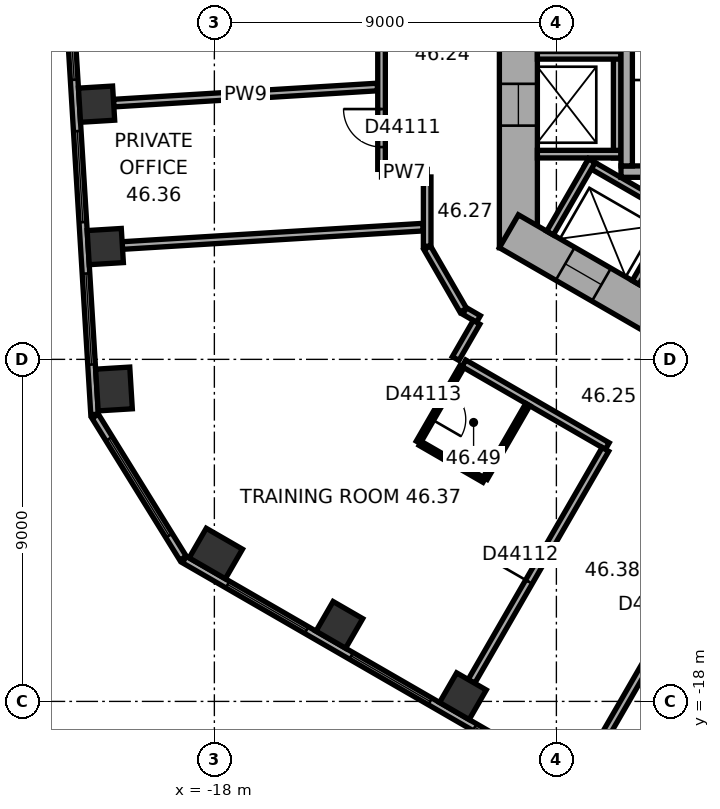
"""IFC4 building model, lengths in metres.
Left out: names, types, materials, properties, quantities, classifications, styles, units other than length and angle.
Written with IfcOpenShell. Run it as: python <this file> out.ifc"""

import sys

from ifc_helpers import new_model, si_unit, direction, frame, frame_2d, origin, origin_2d, place, context, subcontext, project, spatial, rectangle, extrude, element, fill, save


model = new_model("IFC4")
c1 = context("Model", 3, precision=1e-05, world=origin(), true_north=direction((0.0, 1.0)))
c2 = subcontext(c1, "Body", "Model", "MODEL_VIEW")
j1 = project(units=[si_unit("LENGTHUNIT", "METRE"), si_unit("PLANEANGLEUNIT", "RADIAN")], contexts=[c1])
p1 = place(None, origin())
s1 = spatial("IfcSite", under=j1, at=p1, CompositionType="ELEMENT")
p2 = place(p1, origin())
s2 = spatial("IfcBuilding", under=s1, at=p2, CompositionType="ELEMENT")
p3 = place(p2, frame((0.0, 0.0, 187.3)))
s3 = spatial("IfcBuildingStorey", under=s2, at=p3, CompositionType="ELEMENT", Elevation=187.3)
for number, where, z_axis, x_axis in (
    (1, (-21.1, -2.285, 0.0), (0.0, 0.0, 1.0), (0.061, -0.998, 0.0)),
    (2, (-20.871, -6.032, 0.0), (0.0, 0.0, 1.0), (0.061, -0.998, 0.0)),
):
    element("IfcColumn", number, at=place(p3, frame(where, z_axis=z_axis, x_axis=x_axis)), inside=s3, PredefinedType="COLUMN", context=c2, shape_type="SweptSolid", body=[
        extrude(rectangle(XDim=0.9, YDim=0.9, at=origin_2d()), origin(), (0.0, 0.0, 1.0), 3.7),
    ])
for number, where, z_axis, x_axis in (
    (3, (-20.642, -9.779, 0.0), (0.0, 0.0, 1.0), (0.061, -0.998, 0.0)),
    (4, (-17.962, -14.109, 0.0), (0.0, 0.0, 1.0), (0.866, -0.5, 0.0)),
):
    element("IfcColumn", number, at=place(p3, frame(where, z_axis=z_axis, x_axis=x_axis)), inside=s3, PredefinedType="COLUMN", context=c2, shape_type="SweptSolid", body=[
        extrude(rectangle(XDim=1.1, YDim=0.9, at=origin_2d()), origin(), (0.0, 0.0, 1.0), 3.7),
    ])
for number, where, z_axis, x_axis in (
    (5, (-14.711, -15.986, 0.0), (0.0, 0.0, 1.0), (0.866, -0.5, 0.0)),
    (6, (-11.46, -17.863, 0.0), (0.0, 0.0, 1.0), (0.866, -0.5, 0.0)),
):
    element("IfcColumn", number, at=place(p3, frame(where, z_axis=z_axis, x_axis=x_axis)), inside=s3, PredefinedType="COLUMN", context=c2, shape_type="SweptSolid", body=[
        extrude(rectangle(XDim=0.9, YDim=0.9, at=origin_2d()), origin(), (0.0, 0.0, 1.0), 3.7),
    ])
p4 = place(p3, frame((-10.0, 6.062, 0.0), z_axis=(0.0, 0.0, 1.0), x_axis=(0.0, -1.0, 0.0)))
e7 = element("IfcWall", 7, at=p4, inside=s3, PredefinedType="SHEAR", context=c2, shape_type="SweptSolid", body=[
    extrude(rectangle(XDim=12.125, YDim=1.0, at=frame_2d((6.062, 0.0))), origin(), (0.0, 0.0, 1.0), 3.7),
])
p5 = place(p4, frame((5.212, 0.0, 0.0)))
e8 = element("IfcOpeningElement", 8, at=p5, cuts=e7, PredefinedType="OPENING", context=c2, shape_type="SweptSolid", body=[
    extrude(rectangle(XDim=1.1, YDim=2.1, at=frame_2d((0.55, 1.05))), frame((0.0, 0.51, 0.0), z_axis=(0.0, -1.0, 0.0), x_axis=(1.0, 0.0, 0.0)), (0.0, 0.0, 1.0), 1.02),
])
p6 = place(p4, frame((7.812, 0.0, 0.0)))
e9 = element("IfcOpeningElement", 9, at=p6, cuts=e7, PredefinedType="OPENING", context=c2, shape_type="SweptSolid", body=[
    extrude(rectangle(XDim=1.1, YDim=2.1, at=frame_2d((0.55, 1.05))), frame((0.0, 0.51, 0.0), z_axis=(0.0, -1.0, 0.0), x_axis=(1.0, 0.0, 0.0)), (0.0, 0.0, 1.0), 1.02),
])
p7 = place(p3, frame((-10.25, -5.629, 0.0), z_axis=(0.0, 0.0, 1.0), x_axis=(0.866022616891, -0.50000482701, 0.0)))
e10 = element("IfcWall", 10, at=p7, inside=s3, PredefinedType="SHEAR", context=c2, shape_type="SweptSolid", body=[
    extrude(rectangle(XDim=12.125, YDim=1.0, at=frame_2d((6.062, 0.0))), origin(), (0.0, 0.0, 1.0), 3.7),
])
p8 = place(p7, frame((6.262, 0.0, 0.0)))
e11 = element("IfcOpeningElement", 11, at=p8, cuts=e10, PredefinedType="OPENING", context=c2, shape_type="SweptSolid", body=[
    extrude(rectangle(XDim=1.5, YDim=2.1, at=frame_2d((0.75, 1.05))), frame((0.0, 0.51, 0.0), z_axis=(0.0, -1.0, 0.0), x_axis=(1.0, 0.0, 0.0)), (0.0, 0.0, 1.0), 1.02),
])
p9 = place(p7, frame((1.712, 0.0, 0.0)))
e12 = element("IfcOpeningElement", 12, at=p9, cuts=e10, PredefinedType="OPENING", context=c2, shape_type="SweptSolid", body=[
    extrude(rectangle(XDim=1.1, YDim=2.1, at=frame_2d((0.55, 1.05))), frame((0.0, 0.51, 0.0), z_axis=(0.0, -1.0, 0.0), x_axis=(1.0, 0.0, 0.0)), (0.0, 0.0, 1.0), 1.02),
])
p10 = place(p7, frame((4.312, 0.0, 0.0)))
e13 = element("IfcOpeningElement", 13, at=p10, cuts=e10, PredefinedType="OPENING", context=c2, shape_type="SweptSolid", body=[
    extrude(rectangle(XDim=1.1, YDim=2.1, at=frame_2d((0.55, 1.05))), frame((0.0, 0.51, 0.0), z_axis=(0.0, -1.0, 0.0), x_axis=(1.0, 0.0, 0.0)), (0.0, 0.0, 1.0), 1.02),
])
p11 = place(p3, frame((-22.375, 9.557, 0.0), z_axis=(0.0, 0.0, 1.0), x_axis=(0.061036015339, -0.998135564356, 0.0)))
e14 = element("IfcWall", 14, at=p11, inside=s3, PredefinedType="STANDARD", context=c2, shape_type="SweptSolid", body=[
    extrude(rectangle(XDim=20.044, YDim=0.2, at=frame_2d((10.022, 0.0))), origin(), (0.0, 0.0, 1.0), 3.7),
])
p12 = place(p11, frame((1.313, 0.0, 0.9)))
e15 = element("IfcOpeningElement", 15, at=p12, cuts=e14, PredefinedType="OPENING", context=c2, shape_type="SweptSolid", body=[
    extrude(rectangle(XDim=2.4, YDim=2.0, at=frame_2d((1.2, 1.0))), frame((0.0, 0.11, 0.0), z_axis=(0.0, -1.0, 0.0), x_axis=(1.0, 0.0, 0.0)), (0.0, 0.0, 1.0), 0.22),
])
p13 = place(p11, frame((5.067, 0.0, 0.9)))
e16 = element("IfcOpeningElement", 16, at=p13, cuts=e14, PredefinedType="OPENING", context=c2, shape_type="SweptSolid", body=[
    extrude(rectangle(XDim=2.4, YDim=2.0, at=frame_2d((1.2, 1.0))), frame((0.0, 0.11, 0.0), z_axis=(0.0, -1.0, 0.0), x_axis=(1.0, 0.0, 0.0)), (0.0, 0.0, 1.0), 0.22),
])
p14 = place(p11, frame((8.821, 0.0, 0.9)))
e17 = element("IfcOpeningElement", 17, at=p14, cuts=e14, PredefinedType="OPENING", context=c2, shape_type="SweptSolid", body=[
    extrude(rectangle(XDim=2.4, YDim=2.0, at=frame_2d((1.2, 1.0))), frame((0.0, 0.11, 0.0), z_axis=(0.0, -1.0, 0.0), x_axis=(1.0, 0.0, 0.0)), (0.0, 0.0, 1.0), 0.22),
])
p15 = place(p11, frame((12.575, 0.0, 0.9)))
e18 = element("IfcOpeningElement", 18, at=p15, cuts=e14, PredefinedType="OPENING", context=c2, shape_type="SweptSolid", body=[
    extrude(rectangle(XDim=2.4, YDim=2.0, at=frame_2d((1.2, 1.0))), frame((0.0, 0.11, 0.0), z_axis=(0.0, -1.0, 0.0), x_axis=(1.0, 0.0, 0.0)), (0.0, 0.0, 1.0), 0.22),
])
p16 = place(p11, frame((16.329, 0.0, 0.9)))
e19 = element("IfcOpeningElement", 19, at=p16, cuts=e14, PredefinedType="OPENING", context=c2, shape_type="SweptSolid", body=[
    extrude(rectangle(XDim=2.4, YDim=2.0, at=frame_2d((1.2, 1.0))), frame((0.0, 0.11, 0.0), z_axis=(0.0, -1.0, 0.0), x_axis=(1.0, 0.0, 0.0)), (0.0, 0.0, 1.0), 0.22),
])
p17 = place(p3, frame((-21.137, -10.496, 0.0), z_axis=(0.0, 0.0, 1.0), x_axis=(0.526178661629, -0.850374044786, 0.0)))
e20 = element("IfcWall", 20, at=p17, inside=s3, PredefinedType="STANDARD", context=c2, shape_type="SweptSolid", body=[
    extrude(rectangle(XDim=4.395, YDim=0.2, at=frame_2d((2.197, 0.0))), origin(), (0.0, 0.0, 1.0), 3.7),
])
p18 = place(p17, frame((0.698, 0.0, 0.9)))
e21 = element("IfcOpeningElement", 21, at=p18, cuts=e20, PredefinedType="OPENING", context=c2, shape_type="SweptSolid", body=[
    extrude(rectangle(XDim=3.0, YDim=2.0, at=frame_2d((1.5, 1.0))), frame((0.0, 0.11, 0.0), z_axis=(0.0, -1.0, 0.0), x_axis=(1.0, 0.0, 0.0)), (0.0, 0.0, 1.0), 0.22),
])
p19 = place(p3, frame((-18.789, -14.267, 0.0), z_axis=(0.0, 0.0, 1.0), x_axis=(0.866023315909, -0.500003616288, 0.0)))
e22 = element("IfcWall", 22, at=p19, inside=s3, PredefinedType="STANDARD", context=c2, shape_type="SweptSolid", body=[
    extrude(rectangle(XDim=20.044, YDim=0.2, at=frame_2d((10.022, 0.0))), origin(), (0.0, 0.0, 1.0), 3.7),
])
p20 = place(p19, frame((1.314, 0.0, 0.9)))
e23 = element("IfcOpeningElement", 23, at=p20, cuts=e22, PredefinedType="OPENING", context=c2, shape_type="SweptSolid", body=[
    extrude(rectangle(XDim=2.4, YDim=2.0, at=frame_2d((1.2, 1.0))), frame((0.0, 0.11, 0.0), z_axis=(0.0, -1.0, 0.0), x_axis=(1.0, 0.0, 0.0)), (0.0, 0.0, 1.0), 0.22),
])
p21 = place(p19, frame((5.069, 0.0, 0.9)))
e24 = element("IfcOpeningElement", 24, at=p21, cuts=e22, PredefinedType="OPENING", context=c2, shape_type="SweptSolid", body=[
    extrude(rectangle(XDim=2.4, YDim=2.0, at=frame_2d((1.2, 1.0))), frame((0.0, 0.11, 0.0), z_axis=(0.0, -1.0, 0.0), x_axis=(1.0, 0.0, 0.0)), (0.0, 0.0, 1.0), 0.22),
])
p22 = place(p19, frame((8.823, 0.0, 0.9)))
e25 = element("IfcOpeningElement", 25, at=p22, cuts=e22, PredefinedType="OPENING", context=c2, shape_type="SweptSolid", body=[
    extrude(rectangle(XDim=2.4, YDim=2.0, at=frame_2d((1.2, 1.0))), frame((0.0, 0.11, 0.0), z_axis=(0.0, -1.0, 0.0), x_axis=(1.0, 0.0, 0.0)), (0.0, 0.0, 1.0), 0.22),
])
p23 = place(p19, frame((12.577, 0.0, 0.9)))
e26 = element("IfcOpeningElement", 26, at=p23, cuts=e22, PredefinedType="OPENING", context=c2, shape_type="SweptSolid", body=[
    extrude(rectangle(XDim=2.4, YDim=2.0, at=frame_2d((1.2, 1.0))), frame((0.0, 0.11, 0.0), z_axis=(0.0, -1.0, 0.0), x_axis=(1.0, 0.0, 0.0)), (0.0, 0.0, 1.0), 0.22),
])
p24 = place(p19, frame((16.331, 0.0, 0.9)))
e27 = element("IfcOpeningElement", 27, at=p24, cuts=e22, PredefinedType="OPENING", context=c2, shape_type="SweptSolid", body=[
    extrude(rectangle(XDim=2.4, YDim=2.0, at=frame_2d((1.2, 1.0))), frame((0.0, 0.11, 0.0), z_axis=(0.0, -1.0, 0.0), x_axis=(1.0, 0.0, 0.0)), (0.0, 0.0, 1.0), 0.22),
])
p25 = place(p3, frame((-7.4, 4.3, 0.0), z_axis=(0.0, 0.0, 1.0), x_axis=(0.0, -1.0, 0.0)))
e28 = element("IfcWall", 28, at=p25, inside=s3, PredefinedType="PARTITIONING", context=c2, shape_type="SweptSolid", body=[
    extrude(rectangle(XDim=8.0, YDim=0.2, at=frame_2d((4.0, 0.0))), origin(), (0.0, 0.0, 1.0), 3.42),
])
for number, where, z_axis, x_axis in (
    (29, (-7.3, -1.0, 0.0), (0.0, 0.0, 1.0), (-1.0, 0.0, 0.0)),
    (30, (-7.3, -3.6, 0.0), (0.0, 0.0, 1.0), (-1.0, 0.0, 0.0)),
):
    element("IfcWall", number, at=place(p3, frame(where, z_axis=z_axis, x_axis=x_axis)), inside=s3, PredefinedType="PARTITIONING", context=c2, shape_type="SweptSolid", body=[
        extrude(rectangle(XDim=2.2, YDim=0.2, at=frame_2d((1.1, 0.0))), origin(), (0.0, 0.0, 1.0), 3.42),
    ])
p26 = place(p3, frame((-8.203, -3.809, 0.0), z_axis=(0.0, 0.0, 1.0), x_axis=(0.866028230842, -0.499995103361, 0.0)))
e31 = element("IfcWall", 31, at=p26, inside=s3, PredefinedType="PARTITIONING", context=c2, shape_type="SweptSolid", body=[
    extrude(rectangle(XDim=5.4, YDim=0.2, at=frame_2d((2.7, 0.0))), origin(), (0.0, 0.0, 1.0), 3.42),
])
for number, where, z_axis, x_axis in (
    (32, (-8.067, -3.772, 0.0), (0.0, 0.0, 1.0), (-0.5, -0.866, 0.0)),
    (33, (-5.815, -5.072, 0.0), (0.0, 0.0, 1.0), (-0.5, -0.866, 0.0)),
):
    element("IfcWall", number, at=place(p3, frame(where, z_axis=z_axis, x_axis=x_axis)), inside=s3, PredefinedType="PARTITIONING", context=c2, shape_type="SweptSolid", body=[
        extrude(rectangle(XDim=2.2, YDim=0.2, at=frame_2d((1.1, 0.0))), origin(), (0.0, 0.0, 1.0), 3.42),
    ])
p27 = place(p3, frame((-2.6, -4.06, 0.0), z_axis=(0.0, 0.0, 1.0), x_axis=(-1.0, 0.0, 0.0)))
e34 = element("IfcWall", 34, at=p27, inside=s3, PredefinedType="SHEAR", context=c2, shape_type="SweptSolid", body=[
    extrude(rectangle(XDim=4.7, YDim=0.3, at=frame_2d((2.35, 0.0))), origin(), (0.0, 0.0, 1.0), 3.42),
])
p28 = place(p3, frame((-7.15, 3.15, 0.0), z_axis=(0.0, 0.0, 1.0), x_axis=(0.0, -1.0, 0.0)))
e35 = element("IfcWall", 35, at=p28, inside=s3, PredefinedType="SHEAR", context=c2, shape_type="SweptSolid", body=[
    extrude(rectangle(XDim=7.06, YDim=0.3, at=frame_2d((3.53, 0.0))), origin(), (0.0, 0.0, 1.0), 3.42),
])
p29 = place(p3, frame((-20.651, -2.258, 0.0), z_axis=(0.0, 0.0, 1.0), x_axis=(0.998133960965, 0.061062230286, 0.0)))
e36 = element("IfcWall", 36, at=p29, inside=s3, PredefinedType="PARTITIONING", context=c2, shape_type="SweptSolid", body=[
    extrude(rectangle(XDim=6.953, YDim=0.2, at=frame_2d((3.477, 0.0))), origin(), (0.0, 0.0, 1.0), 3.42),
])
p30 = place(p3, frame((-20.421, -6.005, 0.0), z_axis=(0.0, 0.0, 1.0), x_axis=(0.998134865741, 0.061047438866, 0.0)))
e37 = element("IfcWall", 37, at=p30, inside=s3, PredefinedType="PARTITIONING", context=c2, shape_type="SweptSolid", body=[
    extrude(rectangle(XDim=7.927, YDim=0.2, at=frame_2d((3.963, 0.0))), origin(), (0.0, 0.0, 1.0), 2.87),
])
p31 = place(p3, frame((-13.601, -4.101, 0.0), z_axis=(0.0, 0.0, 1.0), x_axis=(1.0, 0.0, 0.0)))
e38 = element("IfcWall", 38, at=p31, inside=s3, PredefinedType="PARTITIONING", context=c2, shape_type="SweptSolid", body=[
    extrude(rectangle(XDim=1.201, YDim=0.2, at=frame_2d((0.601, 0.0))), origin(), (0.0, 0.0, 1.0), 3.42),
])
p32 = place(p3, frame((-13.601, 2.101, 0.0), z_axis=(0.0, 0.0, 1.0), x_axis=(0.0, -1.0, 0.0)))
e39 = element("IfcWall", 39, at=p32, inside=s3, PredefinedType="PARTITIONING", context=c2, shape_type="SweptSolid", body=[
    extrude(rectangle(XDim=6.102, YDim=0.2, at=frame_2d((3.051, 0.0))), origin(), (0.0, 0.0, 1.0), 3.42),
])
p33 = place(p32, frame((4.515, 0.0, 0.0)))
e40 = element("IfcOpeningElement", 40, at=p33, cuts=e39, PredefinedType="OPENING", context=c2, shape_type="SweptSolid", body=[
    extrude(rectangle(XDim=1.0, YDim=2.1, at=frame_2d((0.5, 1.05))), frame((0.0, 0.11, 0.0), z_axis=(0.0, -1.0, 0.0), x_axis=(1.0, 0.0, 0.0)), (0.0, 0.0, 1.0), 0.22),
])
p34 = place(p3, frame((-12.635, -11.182, 0.0), z_axis=(0.0, 0.0, 1.0), x_axis=(0.499952165731, 0.866053019151, 0.0)))
e41 = element("IfcWall", 41, at=p34, inside=s3, PredefinedType="PARTITIONING", context=c2, shape_type="SweptSolid", body=[
    extrude(rectangle(XDim=2.3, YDim=0.12, at=frame_2d((1.15, 0.0))), origin(), (0.0, 0.0, 1.0), 3.42),
])
p35 = place(p34, frame((0.7, 0.0, 0.0)))
e42 = element("IfcOpeningElement", 42, at=p35, cuts=e41, PredefinedType="OPENING", context=c2, shape_type="SweptSolid", body=[
    extrude(rectangle(XDim=0.9, YDim=2.1, at=frame_2d((0.45, 1.05))), frame((0.0, 0.07, 0.0), z_axis=(0.0, -1.0, 0.0), x_axis=(1.0, 0.0, 0.0)), (0.0, 0.0, 1.0), 0.14),
])
p36 = place(p3, frame((-12.4, -6.062, 0.0), z_axis=(0.0, 0.0, 1.0), x_axis=(0.500022797313, -0.86601224135, 0.0)))
e43 = element("IfcWall", 43, at=p36, inside=s3, PredefinedType="PARTITIONING", context=c2, shape_type="SweptSolid", body=[
    extrude(rectangle(XDim=1.9, YDim=0.2, at=frame_2d((0.95, 0.0))), origin(), (0.0, 0.0, 1.0), 3.42),
])
p37 = place(p3, frame((-12.4, -4.201, 0.0), z_axis=(0.0, 0.0, 1.0), x_axis=(0.0, -1.0, 0.0)))
e44 = element("IfcWall", 44, at=p37, inside=s3, PredefinedType="PARTITIONING", context=c2, shape_type="SweptSolid", body=[
    extrude(rectangle(XDim=1.821, YDim=0.2, at=frame_2d((0.911, 0.0))), origin(), (0.0, 0.0, 1.0), 3.42),
])
p38 = place(p3, frame((-11.435, -9.103, 0.0), z_axis=(0.0, 0.0, 1.0), x_axis=(0.866007399799, -0.500031182522, 0.0)))
e45 = element("IfcWall", 45, at=p38, inside=s3, PredefinedType="PARTITIONING", context=c2, shape_type="SweptSolid", body=[
    extrude(rectangle(XDim=4.358, YDim=0.2, at=frame_2d((2.179, 0.0))), origin(), (0.0, 0.0, 1.0), 3.42),
])
p39 = place(p3, frame((-11.415, -7.728, 0.0), z_axis=(0.0, 0.0, 1.0), x_axis=(0.865915281873, -0.500190688257, 0.0)))
e46 = element("IfcWall", 46, at=p39, inside=s3, PredefinedType="PARTITIONING", context=c2, shape_type="SweptSolid", body=[
    extrude(rectangle(XDim=0.421, YDim=0.2, at=frame_2d((0.21, 0.0))), origin(), (0.0, 0.0, 1.0), 3.42),
])
p40 = place(p3, frame((-11.235, -17.474, 0.0), z_axis=(0.0, 0.0, 1.0), x_axis=(0.500009260695, 0.866020057054, 0.0)))
e47 = element("IfcWall", 47, at=p40, inside=s3, PredefinedType="PARTITIONING", context=c2, shape_type="SweptSolid", body=[
    extrude(rectangle(XDim=7.049, YDim=0.2, at=frame_2d((3.524, 0.0))), origin(), (0.0, 0.0, 1.0), 2.87),
])
p41 = place(p40, frame((3.024, 0.0, 0.0)))
e48 = element("IfcOpeningElement", 48, at=p41, cuts=e47, PredefinedType="OPENING", context=c2, shape_type="SweptSolid", body=[
    extrude(rectangle(XDim=1.0, YDim=2.1, at=frame_2d((0.5, 1.05))), frame((0.0, 0.11, 0.0), z_axis=(0.0, -1.0, 0.0), x_axis=(1.0, 0.0, 0.0)), (0.0, 0.0, 1.0), 0.22),
])
p42 = place(p3, frame((-11.101, -8.025, 0.0), z_axis=(0.0, 0.0, 1.0), x_axis=(-0.500074377092, -0.865982457891, 0.0)))
e49 = element("IfcWall", 49, at=p42, inside=s3, PredefinedType="PARTITIONING", context=c2, shape_type="SweptSolid", body=[
    extrude(rectangle(XDim=1.101, YDim=0.2, at=frame_2d((0.55, 0.0))), origin(), (0.0, 0.0, 1.0), 3.42),
])
p43 = place(p3, frame((-10.903, -12.182, 0.0), z_axis=(0.0, 0.0, 1.0), x_axis=(-0.866011626733, 0.500023861795, 0.0)))
e50 = element("IfcWall", 50, at=p43, inside=s3, PredefinedType="PARTITIONING", context=c2, shape_type="SweptSolid", body=[
    extrude(rectangle(XDim=1.94, YDim=0.12, at=frame_2d((0.97, 0.0))), origin(), (0.0, 0.0, 1.0), 3.42),
])
p44 = place(p3, frame((-9.753, -10.19, 0.0), z_axis=(0.0, 0.0, 1.0), x_axis=(-0.49994888933, -0.866054910533, 0.0)))
e51 = element("IfcWall", 51, at=p44, inside=s3, PredefinedType="PARTITIONING", context=c2, shape_type="SweptSolid", body=[
    extrude(rectangle(XDim=2.24, YDim=0.12, at=frame_2d((1.12, 0.0))), origin(), (0.0, 0.0, 1.0), 3.42),
])
p45 = place(p3, frame((-7.984, -19.351, 0.0), z_axis=(0.0, 0.0, 1.0), x_axis=(0.500010139422, 0.866019549707, 0.0)))
e52 = element("IfcWall", 52, at=p45, inside=s3, PredefinedType="PARTITIONING", context=c2, shape_type="SweptSolid", body=[
    extrude(rectangle(XDim=8.35, YDim=0.2, at=frame_2d((4.175, 0.0))), origin(), (0.0, 0.0, 1.0), 3.42),
])
p46 = place(p45, frame((3.675, 0.0, 0.0)))
e53 = element("IfcOpeningElement", 53, at=p46, cuts=e52, PredefinedType="OPENING", context=c2, shape_type="SweptSolid", body=[
    extrude(rectangle(XDim=1.0, YDim=2.1, at=frame_2d((0.5, 1.05))), frame((0.0, 0.11, 0.0), z_axis=(0.0, -1.0, 0.0), x_axis=(1.0, 0.0, 0.0)), (0.0, 0.0, 1.0), 0.22),
])
p47 = place(p14, origin())
e54 = element("IfcWindow", 54, at=p47, inside=s3, PartitioningType="SINGLE_PANEL", PredefinedType="WINDOW", context=c2, shape_type="SweptSolid", body=[
    extrude(rectangle(XDim=2.4, YDim=2.0, at=frame_2d((1.2, 1.0))), frame((0.0, 0.03, 0.0), z_axis=(0.0, -1.0, 0.0), x_axis=(1.0, 0.0, 0.0)), (0.0, 0.0, 1.0), 0.06),
])
fill(e17, e54)
p48 = place(p15, origin())
e55 = element("IfcWindow", 55, at=p48, inside=s3, PartitioningType="SINGLE_PANEL", PredefinedType="WINDOW", context=c2, shape_type="SweptSolid", body=[
    extrude(rectangle(XDim=2.4, YDim=2.0, at=frame_2d((1.2, 1.0))), frame((0.0, 0.03, 0.0), z_axis=(0.0, -1.0, 0.0), x_axis=(1.0, 0.0, 0.0)), (0.0, 0.0, 1.0), 0.06),
])
fill(e18, e55)
p49 = place(p16, origin())
e56 = element("IfcWindow", 56, at=p49, inside=s3, PartitioningType="SINGLE_PANEL", PredefinedType="WINDOW", context=c2, shape_type="SweptSolid", body=[
    extrude(rectangle(XDim=2.4, YDim=2.0, at=frame_2d((1.2, 1.0))), frame((0.0, 0.03, 0.0), z_axis=(0.0, -1.0, 0.0), x_axis=(1.0, 0.0, 0.0)), (0.0, 0.0, 1.0), 0.06),
])
fill(e19, e56)
p50 = place(p18, origin())
e57 = element("IfcWindow", 57, at=p50, inside=s3, PartitioningType="SINGLE_PANEL", PredefinedType="WINDOW", context=c2, shape_type="SweptSolid", body=[
    extrude(rectangle(XDim=3.0, YDim=2.0, at=frame_2d((1.5, 1.0))), frame((0.0, 0.03, 0.0), z_axis=(0.0, -1.0, 0.0), x_axis=(1.0, 0.0, 0.0)), (0.0, 0.0, 1.0), 0.06),
])
fill(e21, e57)
p51 = place(p20, origin())
e58 = element("IfcWindow", 58, at=p51, inside=s3, PartitioningType="SINGLE_PANEL", PredefinedType="WINDOW", context=c2, shape_type="SweptSolid", body=[
    extrude(rectangle(XDim=2.4, YDim=2.0, at=frame_2d((1.2, 1.0))), frame((0.0, 0.03, 0.0), z_axis=(0.0, -1.0, 0.0), x_axis=(1.0, 0.0, 0.0)), (0.0, 0.0, 1.0), 0.06),
])
fill(e23, e58)
p52 = place(p21, origin())
e59 = element("IfcWindow", 59, at=p52, inside=s3, PartitioningType="SINGLE_PANEL", PredefinedType="WINDOW", context=c2, shape_type="SweptSolid", body=[
    extrude(rectangle(XDim=2.4, YDim=2.0, at=frame_2d((1.2, 1.0))), frame((0.0, 0.03, 0.0), z_axis=(0.0, -1.0, 0.0), x_axis=(1.0, 0.0, 0.0)), (0.0, 0.0, 1.0), 0.06),
])
fill(e24, e59)
p53 = place(p22, origin())
e60 = element("IfcWindow", 60, at=p53, inside=s3, PartitioningType="SINGLE_PANEL", PredefinedType="WINDOW", context=c2, shape_type="SweptSolid", body=[
    extrude(rectangle(XDim=2.4, YDim=2.0, at=frame_2d((1.2, 1.0))), frame((0.0, 0.03, 0.0), z_axis=(0.0, -1.0, 0.0), x_axis=(1.0, 0.0, 0.0)), (0.0, 0.0, 1.0), 0.06),
])
fill(e25, e60)
p54 = place(p6, origin())
e61 = element("IfcDoor", 61, at=p54, inside=s3, OperationType="DOUBLE_DOOR_SLIDING", PredefinedType="DOOR", context=c2, shape_type="SweptSolid", body=[
    extrude(rectangle(XDim=1.1, YDim=2.1, at=frame_2d((0.55, 1.05))), frame((0.0, 0.025, 0.0), z_axis=(0.0, -1.0, 0.0), x_axis=(1.0, 0.0, 0.0)), (0.0, 0.0, 1.0), 0.05),
])
fill(e9, e61)
p55 = place(p9, origin())
e62 = element("IfcDoor", 62, at=p55, inside=s3, OperationType="DOUBLE_DOOR_SLIDING", PredefinedType="DOOR", context=c2, shape_type="SweptSolid", body=[
    extrude(rectangle(XDim=1.1, YDim=2.1, at=frame_2d((0.55, 1.05))), frame((0.0, 0.025, 0.0), z_axis=(0.0, -1.0, 0.0), x_axis=(1.0, 0.0, 0.0)), (0.0, 0.0, 1.0), 0.05),
])
fill(e12, e62)
p56 = place(p33, origin())
e63 = element("IfcDoor", 63, at=p56, inside=s3, OperationType="SINGLE_SWING_LEFT", PredefinedType="DOOR", context=c2, shape_type="SweptSolid", body=[
    extrude(rectangle(XDim=1.0, YDim=2.1, at=frame_2d((0.5, 1.05))), frame((0.0, 0.025, 0.0), z_axis=(0.0, -1.0, 0.0), x_axis=(1.0, 0.0, 0.0)), (0.0, 0.0, 1.0), 0.05),
])
fill(e40, e63)
p57 = place(p41, origin())
e64 = element("IfcDoor", 64, at=p57, inside=s3, OperationType="SINGLE_SWING_LEFT", PredefinedType="DOOR", context=c2, shape_type="SweptSolid", body=[
    extrude(rectangle(XDim=1.0, YDim=2.1, at=frame_2d((0.5, 1.05))), frame((0.0, 0.025, 0.0), z_axis=(0.0, -1.0, 0.0), x_axis=(1.0, 0.0, 0.0)), (0.0, 0.0, 1.0), 0.05),
])
fill(e48, e64)
p58 = place(p35, origin())
e65 = element("IfcDoor", 65, at=p58, inside=s3, OperationType="SINGLE_SWING_LEFT", PredefinedType="DOOR", context=c2, shape_type="SweptSolid", body=[
    extrude(rectangle(XDim=0.9, YDim=2.1, at=frame_2d((0.45, 1.05))), frame((0.0, 0.025, 0.0), z_axis=(0.0, -1.0, 0.0), x_axis=(1.0, 0.0, 0.0)), (0.0, 0.0, 1.0), 0.05),
])
fill(e42, e65)
save(model, sys.argv[1])
